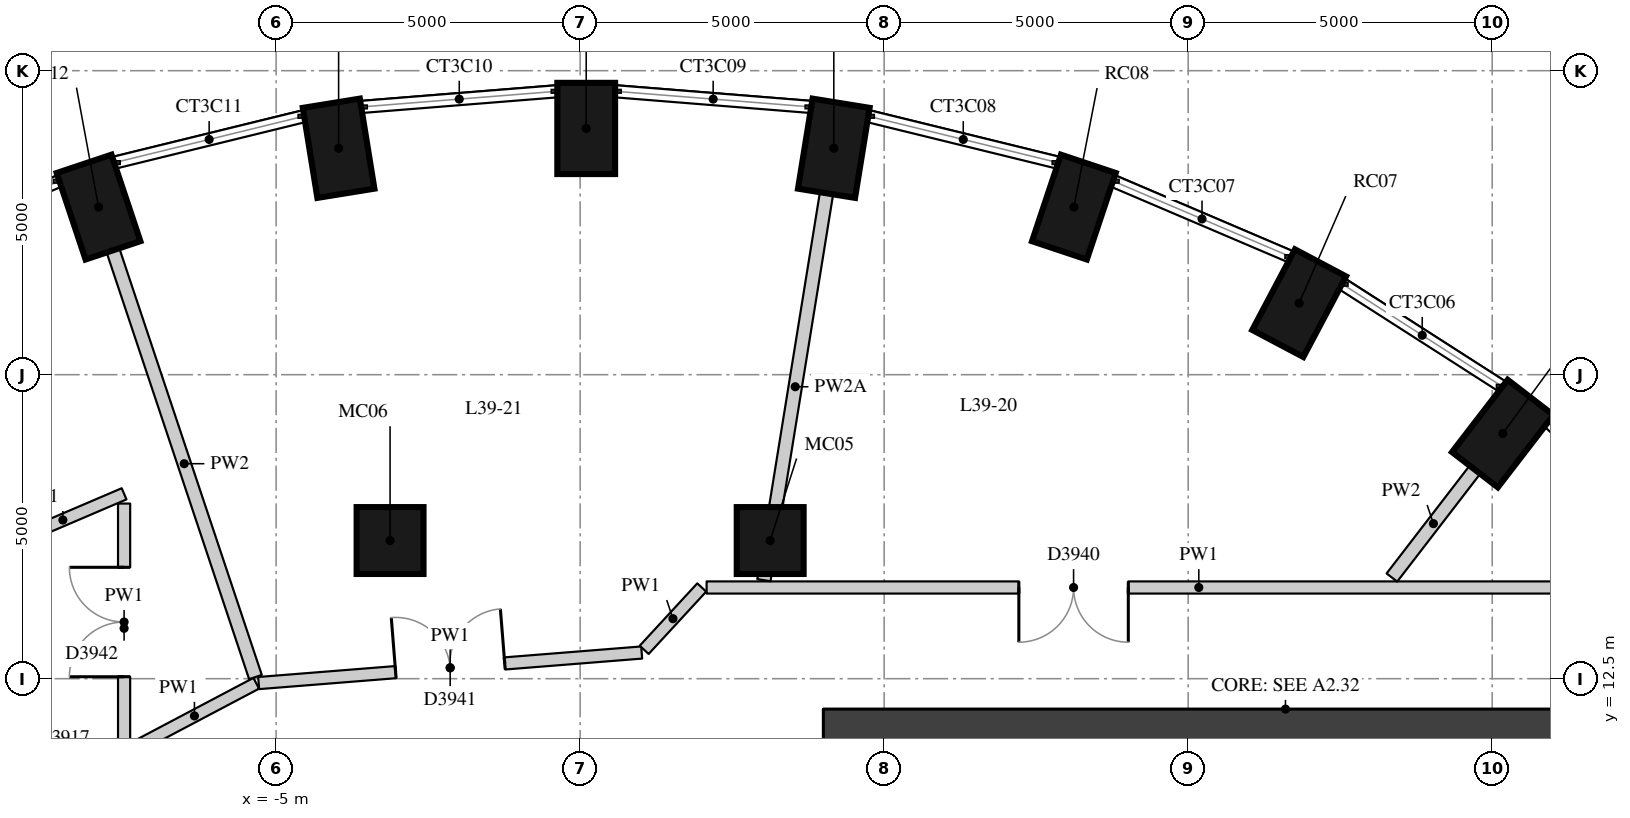
"""IFC4 building model, lengths in metres.
Left out: names, types, materials, properties, quantities, classifications, styles, units other than length and angle.
Written with IfcOpenShell. Run it as: python <this file> out.ifc"""

import sys

from ifc_helpers import new_model, si_unit, direction, frame, frame_2d, origin, origin_2d, place, context, subcontext, project, spatial, rectangle, extrude, element, fill, save


model = new_model("IFC4")
c1 = context("Model", 3, precision=1e-05, world=origin(), true_north=direction((0.0, 1.0)))
c2 = subcontext(c1, "Body", "Model", "MODEL_VIEW")
j1 = project(units=[si_unit("LENGTHUNIT", "METRE"), si_unit("PLANEANGLEUNIT", "RADIAN")], contexts=[c1])
p1 = place(None, origin())
s1 = spatial("IfcSite", under=j1, at=p1, CompositionType="ELEMENT")
p2 = place(p1, origin())
s2 = spatial("IfcBuilding", under=s1, at=p2, CompositionType="ELEMENT")
p3 = place(p2, frame((0.0, 0.0, 139.6)))
s3 = spatial("IfcBuildingStorey", under=s2, at=p3, CompositionType="ELEMENT", Elevation=139.6)
for number, where, z_axis, x_axis in (
    (1, (15.173, 16.532, 0.0), (0.0, 0.0, 1.0), (0.61, 0.792, 0.0)),
    (2, (11.825, 18.676, 0.0), (0.0, 0.0, 1.0), (0.468, 0.884, 0.0)),
    (3, (8.12, 20.256, 0.0), (0.0, 0.0, 1.0), (0.317, 0.949, 0.0)),
    (4, (4.172, 21.224, 0.0), (0.0, 0.0, 1.0), (0.16, 0.987, 0.0)),
    (5, (0.1, 21.55, 0.0), (0.0, 0.0, 1.0), (0.0, 1.0, 0.0)),
    (6, (-3.972, 21.224, 0.0), (0.0, 0.0, 1.0), (-0.16, 0.987, 0.0)),
    (7, (-7.92, 20.256, 0.0), (0.0, 0.0, 1.0), (-0.317, 0.949, 0.0)),
):
    element("IfcColumn", number, at=place(p3, frame(where, z_axis=z_axis, x_axis=x_axis)), inside=s3, PredefinedType="COLUMN", context=c2, shape_type="SweptSolid", body=[
        extrude(rectangle(XDim=1.5, YDim=0.95, at=origin_2d()), origin(), (0.0, 0.0, 1.0), 5.5),
    ])
for number, where, z_axis, x_axis in (
    (8, (3.126, 14.772, 0.0), (0.0, 0.0, 1.0), (1.0, 0.0, 0.0)),
    (9, (-3.126, 14.772, 0.0), (0.0, 0.0, 1.0), (1.0, 0.0, 0.0)),
):
    element("IfcColumn", number, at=place(p3, frame(where, z_axis=z_axis, x_axis=x_axis)), inside=s3, PredefinedType="COLUMN", context=c2, shape_type="SweptSolid", body=[
        extrude(rectangle(XDim=1.1, YDim=1.1, at=origin_2d()), origin(), (0.0, 0.0, 1.0), 5.5),
    ])
p4 = place(p3, frame((4.0, 11.55, 0.0), z_axis=(0.0, 0.0, 1.0), x_axis=(1.0, 0.0, 0.0)))
e10 = element("IfcWall", 10, at=p4, inside=s3, PredefinedType="SHEAR", context=c2, shape_type="SweptSolid", body=[
    extrude(rectangle(XDim=15.2, YDim=0.9, at=frame_2d((7.6, 0.0))), origin(), (0.0, 0.0, 1.0), 5.22),
])
p5 = place(p3, frame((-9.513, 14.679, 0.0), z_axis=(0.0, 0.0, 1.0), x_axis=(0.919404318023, 0.39331374245, 0.0)))
e11 = element("IfcWall", 11, at=p5, inside=s3, PredefinedType="PARTITIONING", context=c2, shape_type="SweptSolid", body=[
    extrude(rectangle(XDim=2.19, YDim=0.2, at=frame_2d((1.095, 0.0))), origin(), (0.0, 0.0, 1.0), 5.22),
])
p6 = place(p3, frame((-7.5, 15.38, 0.0), z_axis=(0.0, 0.0, 1.0), x_axis=(0.0, -1.0, 0.0)))
e12 = element("IfcWall", 12, at=p6, inside=s3, PredefinedType="PARTITIONING", context=c2, shape_type="SweptSolid", body=[
    extrude(rectangle(XDim=4.104, YDim=0.2, at=frame_2d((2.052, 0.0))), origin(), (0.0, 0.0, 1.0), 5.22),
])
p7 = place(p6, frame((1.048, 0.0, 0.0)))
e13 = element("IfcOpeningElement", 13, at=p7, cuts=e12, PredefinedType="OPENING", context=c2, shape_type="SweptSolid", body=[
    extrude(rectangle(XDim=1.8, YDim=2.1, at=frame_2d((0.9, 1.05))), frame((0.0, 0.11, 0.0), z_axis=(0.0, -1.0, 0.0), x_axis=(1.0, 0.0, 0.0)), (0.0, 0.0, 1.0), 0.22),
])
p8 = place(p3, frame((-7.359, 11.351, 0.0), z_axis=(0.0, 0.0, 1.0), x_axis=(0.884221521194, 0.467067769663, 0.0)))
e14 = element("IfcWall", 14, at=p8, inside=s3, PredefinedType="PARTITIONING", context=c2, shape_type="SweptSolid", body=[
    extrude(rectangle(XDim=2.299, YDim=0.2, at=frame_2d((1.149, 0.0))), origin(), (0.0, 0.0, 1.0), 5.22),
])
p9 = place(p3, frame((-5.287, 12.428, 0.0), z_axis=(0.0, 0.0, 1.0), x_axis=(0.996833679726, 0.079514872592, 0.0)))
e15 = element("IfcWall", 15, at=p9, inside=s3, PredefinedType="PARTITIONING", context=c2, shape_type="SweptSolid", body=[
    extrude(rectangle(XDim=6.319, YDim=0.2, at=frame_2d((3.159, 0.0))), origin(), (0.0, 0.0, 1.0), 5.22),
])
p10 = place(p9, frame((2.26, 0.0, 0.0)))
e16 = element("IfcOpeningElement", 16, at=p10, cuts=e15, PredefinedType="OPENING", context=c2, shape_type="SweptSolid", body=[
    extrude(rectangle(XDim=1.8, YDim=2.1, at=frame_2d((0.9, 1.05))), frame((0.0, 0.11, 0.0), z_axis=(0.0, -1.0, 0.0), x_axis=(1.0, 0.0, 0.0)), (0.0, 0.0, 1.0), 0.22),
])
p11 = place(p3, frame((1.053, 12.974, 0.0), z_axis=(0.0, 0.0, 1.0), x_axis=(0.67829463173, 0.73479003298, 0.0)))
e17 = element("IfcWall", 17, at=p11, inside=s3, PredefinedType="PARTITIONING", context=c2, shape_type="SweptSolid", body=[
    extrude(rectangle(XDim=1.396, YDim=0.2, at=frame_2d((0.698, 0.0))), origin(), (0.0, 0.0, 1.0), 5.22),
])
p12 = place(p3, frame((2.08, 14.0, 0.0), z_axis=(0.0, 0.0, 1.0), x_axis=(1.0, 0.0, 0.0)))
e18 = element("IfcWall", 18, at=p12, inside=s3, PredefinedType="PARTITIONING", context=c2, shape_type="SweptSolid", body=[
    extrude(rectangle(XDim=16.189, YDim=0.2, at=frame_2d((8.095, 0.0))), origin(), (0.0, 0.0, 1.0), 5.22),
])
p13 = place(p12, frame((5.135, 0.0, 0.0)))
e19 = element("IfcOpeningElement", 19, at=p13, cuts=e18, PredefinedType="OPENING", context=c2, shape_type="SweptSolid", body=[
    extrude(rectangle(XDim=1.8, YDim=2.1, at=frame_2d((0.9, 1.05))), frame((0.0, 0.11, 0.0), z_axis=(0.0, -1.0, 0.0), x_axis=(1.0, 0.0, 0.0)), (0.0, 0.0, 1.0), 0.22),
])
p14 = place(p3, frame((14.716, 15.937, 0.0), z_axis=(0.0, 0.0, 1.0), x_axis=(-0.610021701862, -0.792384706602, 0.0)))
e20 = element("IfcWall", 20, at=p14, inside=s3, PredefinedType="PARTITIONING", context=c2, shape_type="SweptSolid", body=[
    extrude(rectangle(XDim=2.239, YDim=0.22, at=frame_2d((1.119, 0.0))), origin(), (0.0, 0.0, 1.0), 5.22),
])
p15 = place(p3, frame((4.052, 20.484, 0.0), z_axis=(0.0, 0.0, 1.0), x_axis=(-0.159705125946, -0.987164764741, 0.0)))
e21 = element("IfcWall", 21, at=p15, inside=s3, PredefinedType="PARTITIONING", context=c2, shape_type="SweptSolid", body=[
    extrude(rectangle(XDim=6.447, YDim=0.22, at=frame_2d((3.223, 0.0))), origin(), (0.0, 0.0, 1.0), 4.77),
])
p16 = place(p3, frame((-7.683, 19.545, 0.0), z_axis=(0.0, 0.0, 1.0), x_axis=(0.316712792199, -0.948521484869, 0.0)))
e22 = element("IfcWall", 22, at=p16, inside=s3, PredefinedType="PARTITIONING", context=c2, shape_type="SweptSolid", body=[
    extrude(rectangle(XDim=7.399, YDim=0.22, at=frame_2d((3.699, 0.0))), origin(), (0.0, 0.0, 1.0), 5.22),
])
p17 = place(p13, origin())
e23 = element("IfcDoor", 23, at=p17, inside=s3, OperationType="DOUBLE_DOOR_SINGLE_SWING", PredefinedType="DOOR", context=c2, shape_type="SweptSolid", body=[
    extrude(rectangle(XDim=1.8, YDim=2.1, at=frame_2d((0.9, 1.05))), frame((0.0, 0.025, 0.0), z_axis=(0.0, -1.0, 0.0), x_axis=(1.0, 0.0, 0.0)), (0.0, 0.0, 1.0), 0.05),
])
fill(e19, e23)
p18 = place(p10, origin())
e24 = element("IfcDoor", 24, at=p18, inside=s3, OperationType="DOUBLE_DOOR_SINGLE_SWING", PredefinedType="DOOR", context=c2, shape_type="SweptSolid", body=[
    extrude(rectangle(XDim=1.8, YDim=2.1, at=frame_2d((0.9, 1.05))), frame((0.0, 0.025, 0.0), z_axis=(0.0, -1.0, 0.0), x_axis=(1.0, 0.0, 0.0)), (0.0, 0.0, 1.0), 0.05),
])
fill(e16, e24)
p19 = place(p7, origin())
e25 = element("IfcDoor", 25, at=p19, inside=s3, OperationType="DOUBLE_DOOR_SINGLE_SWING", PredefinedType="DOOR", context=c2, shape_type="SweptSolid", body=[
    extrude(rectangle(XDim=1.8, YDim=2.1, at=frame_2d((0.9, 1.05))), frame((0.0, 0.025, 0.0), z_axis=(0.0, -1.0, 0.0), x_axis=(1.0, 0.0, 0.0)), (0.0, 0.0, 1.0), 0.05),
])
fill(e13, e25)
save(model, sys.argv[1])
